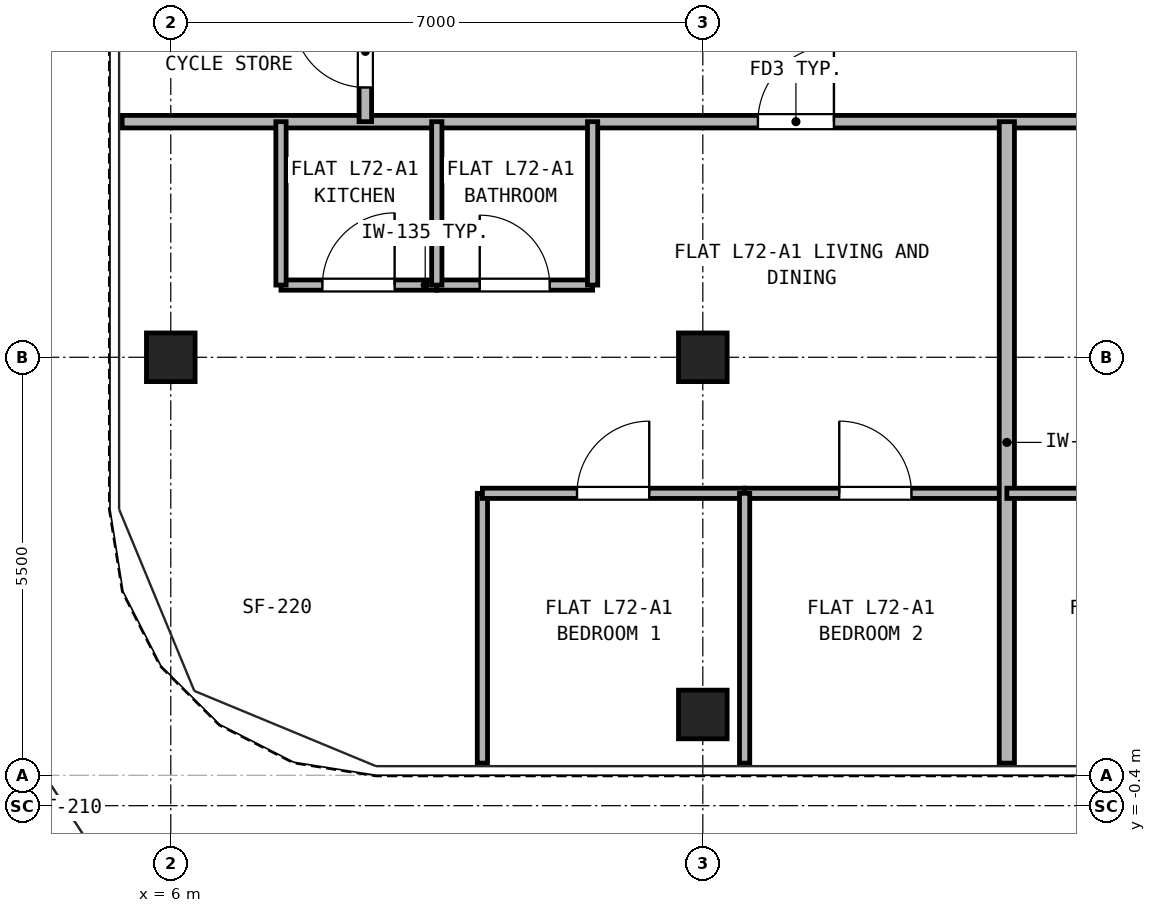
"""IFC4 building model, lengths in metres.
Left out: names, types, materials, properties, quantities, classifications, styles, units other than length and angle.
Written with IfcOpenShell. Run it as: python <this file> out.ifc"""

import sys

from ifc_helpers import new_model, si_unit, direction, frame, frame_2d, origin, origin_2d, place, context, subcontext, project, spatial, rectangle, hollow_rectangle, extrude, source, transform, mapped, element, fill, save


model = new_model("IFC4")
c1 = context("Model", 3, precision=1e-05, world=origin(), true_north=direction((0.0, 1.0)))
c2 = subcontext(c1, "Body", "Model", "MODEL_VIEW")
j1 = project(units=[si_unit("LENGTHUNIT", "METRE"), si_unit("PLANEANGLEUNIT", "RADIAN")], contexts=[c1])
p1 = place(None, origin())
s1 = spatial("IfcSite", under=j1, at=p1, CompositionType="ELEMENT")
p2 = place(p1, origin())
s2 = spatial("IfcBuilding", under=s1, at=p2, CompositionType="ELEMENT")
p3 = place(p2, frame((0.0, 0.0, 252.1)))
s3 = spatial("IfcBuildingStorey", under=s2, at=p3, CompositionType="ELEMENT", Elevation=252.1)
m1 = source(origin(), c2, "Body", "SweptSolid", [
    extrude(hollow_rectangle(XDim=0.64, YDim=0.64, WallThickness=0.035, at=origin_2d()), origin(), (0.0, 0.0, 1.0), 2.98),
])
for number, where, z_axis, x_axis in (
    (1, (13.0, 0.8, 0.0), (0.0, 0.0, 1.0), (1.0, 0.0, 0.0)),
    (2, (6.0, 5.5, 0.0), (0.0, 0.0, 1.0), (1.0, 0.0, 0.0)),
    (3, (13.0, 5.5, 0.0), (0.0, 0.0, 1.0), (1.0, 0.0, 0.0)),
):
    element("IfcColumn", number, at=place(p3, frame(where, z_axis=z_axis, x_axis=x_axis)), inside=s3, PredefinedType="COLUMN", context=c2, shape_type="MappedRepresentation", body=[
        mapped(m1, transform((0.0, 0.0, 0.0), x_axis=(1.0, 0.0, 0.0), y_axis=(0.0, 1.0, 0.0), z_axis=(0.0, 0.0, 1.0), scale=1.0)),
    ])
p4 = place(p3, frame((5.36, 8.6, 0.0), z_axis=(0.0, 0.0, 1.0), x_axis=(1.0, 0.0, 0.0)))
e4 = element("IfcWall", 4, at=p4, inside=s3, PredefinedType="PARTITIONING", context=c2, shape_type="SweptSolid", body=[
    extrude(rectangle(XDim=36.28, YDim=0.165, at=frame_2d((18.14, 0.0))), origin(), (0.0, 0.0, 1.0), 2.655),
])
p5 = place(p4, frame((8.365, 0.0, 0.0)))
e5 = element("IfcOpeningElement", 5, at=p5, cuts=e4, PredefinedType="OPENING", context=c2, shape_type="SweptSolid", body=[
    extrude(rectangle(XDim=1.0, YDim=2.15, at=frame_2d((0.5, 1.075))), frame((0.0, 0.093, 0.0), z_axis=(0.0, -1.0, 0.0), x_axis=(1.0, 0.0, 0.0)), (0.0, 0.0, 1.0), 0.185),
])
p6 = place(p4, frame((14.165, 0.0, 0.0)))
e6 = element("IfcOpeningElement", 6, at=p6, cuts=e4, PredefinedType="OPENING", context=c2, shape_type="SweptSolid", body=[
    extrude(rectangle(XDim=1.0, YDim=2.15, at=frame_2d((0.5, 1.075))), frame((0.0, 0.093, 0.0), z_axis=(0.0, -1.0, 0.0), x_axis=(1.0, 0.0, 0.0)), (0.0, 0.0, 1.0), 0.185),
])
p7 = place(p4, frame((26.415, 0.0, 0.0)))
e7 = element("IfcOpeningElement", 7, at=p7, cuts=e4, PredefinedType="OPENING", context=c2, shape_type="SweptSolid", body=[
    extrude(rectangle(XDim=1.0, YDim=2.15, at=frame_2d((0.5, 1.075))), frame((0.0, 0.093, 0.0), z_axis=(0.0, -1.0, 0.0), x_axis=(1.0, 0.0, 0.0)), (0.0, 0.0, 1.0), 0.185),
])
p8 = place(p3, frame((8.56, 8.6, 0.0), z_axis=(0.0, 0.0, 1.0), x_axis=(0.0, 1.0, 0.0)))
e8 = element("IfcWall", 8, at=p8, inside=s3, PredefinedType="PARTITIONING", context=c2, shape_type="SweptSolid", body=[
    extrude(rectangle(XDim=2.0, YDim=0.165, at=frame_2d((1.0, 0.0))), origin(), (0.0, 0.0, 1.0), 2.98),
])
p9 = place(p8, frame((0.45, 0.0, 0.0)))
e9 = element("IfcOpeningElement", 9, at=p9, cuts=e8, PredefinedType="OPENING", context=c2, shape_type="SweptSolid", body=[
    extrude(rectangle(XDim=0.95, YDim=2.15, at=frame_2d((0.475, 1.075))), frame((0.0, 0.093, 0.0), z_axis=(0.0, -1.0, 0.0), x_axis=(1.0, 0.0, 0.0)), (0.0, 0.0, 1.0), 0.185),
])
p10 = place(p3, frame((7.45, 6.45, 0.0), z_axis=(0.0, 0.0, 1.0), x_axis=(1.0, 0.0, 0.0)))
e10 = element("IfcWall", 10, at=p10, inside=s3, PredefinedType="PARTITIONING", context=c2, shape_type="SweptSolid", body=[
    extrude(rectangle(XDim=2.05, YDim=0.135, at=frame_2d((1.025, 0.0))), origin(), (0.0, 0.0, 1.0), 2.98),
])
p11 = place(p10, frame((0.545, 0.0, 0.0)))
e11 = element("IfcOpeningElement", 11, at=p11, cuts=e10, PredefinedType="OPENING", context=c2, shape_type="SweptSolid", body=[
    extrude(rectangle(XDim=0.95, YDim=2.15, at=frame_2d((0.475, 1.075))), frame((0.0, 0.077, 0.0), z_axis=(0.0, -1.0, 0.0), x_axis=(1.0, 0.0, 0.0)), (0.0, 0.0, 1.0), 0.155),
])
p12 = place(p3, frame((9.5, 6.45, 0.0), z_axis=(0.0, 0.0, 1.0), x_axis=(1.0, 0.0, 0.0)))
e12 = element("IfcWall", 12, at=p12, inside=s3, PredefinedType="PARTITIONING", context=c2, shape_type="SweptSolid", body=[
    extrude(rectangle(XDim=2.05, YDim=0.135, at=frame_2d((1.025, 0.0))), origin(), (0.0, 0.0, 1.0), 2.98),
])
p13 = place(p12, frame((0.565, 0.0, 0.0)))
e13 = element("IfcOpeningElement", 13, at=p13, cuts=e12, PredefinedType="OPENING", context=c2, shape_type="SweptSolid", body=[
    extrude(rectangle(XDim=0.92, YDim=2.1, at=frame_2d((0.46, 1.05))), frame((0.0, 0.077, 0.0), z_axis=(0.0, -1.0, 0.0), x_axis=(1.0, 0.0, 0.0)), (0.0, 0.0, 1.0), 0.155),
])
for number, where, z_axis, x_axis in (
    (14, (7.45, 6.45, 0.0), (0.0, 0.0, 1.0), (0.0, 1.0, 0.0)),
    (15, (9.5, 6.45, 0.0), (0.0, 0.0, 1.0), (0.0, 1.0, 0.0)),
    (16, (11.55, 6.45, 0.0), (0.0, 0.0, 1.0), (0.0, 1.0, 0.0)),
):
    element("IfcWall", number, at=place(p3, frame(where, z_axis=z_axis, x_axis=x_axis)), inside=s3, PredefinedType="PARTITIONING", context=c2, shape_type="SweptSolid", body=[
        extrude(rectangle(XDim=2.15, YDim=0.135, at=frame_2d((1.075, 0.0))), origin(), (0.0, 0.0, 1.0), 2.98),
    ])
p14 = place(p3, frame((10.1, 0.16, 0.0), z_axis=(0.0, 0.0, 1.0), x_axis=(0.0, 1.0, 0.0)))
e17 = element("IfcWall", 17, at=p14, inside=s3, PredefinedType="PARTITIONING", context=c2, shape_type="SweptSolid", body=[
    extrude(rectangle(XDim=3.55, YDim=0.135, at=frame_2d((1.775, 0.0))), origin(), (0.0, 0.0, 1.0), 2.98),
])
p15 = place(p3, frame((10.1, 3.71, 0.0), z_axis=(0.0, 0.0, 1.0), x_axis=(1.0, 0.0, 0.0)))
e18 = element("IfcWall", 18, at=p15, inside=s3, PredefinedType="PARTITIONING", context=c2, shape_type="SweptSolid", body=[
    extrude(rectangle(XDim=3.45, YDim=0.135, at=frame_2d((1.725, 0.0))), origin(), (0.0, 0.0, 1.0), 2.98),
])
p16 = place(p15, frame((1.245, 0.0, 0.0)))
e19 = element("IfcOpeningElement", 19, at=p16, cuts=e18, PredefinedType="OPENING", context=c2, shape_type="SweptSolid", body=[
    extrude(rectangle(XDim=0.95, YDim=2.15, at=frame_2d((0.475, 1.075))), frame((0.0, 0.077, 0.0), z_axis=(0.0, -1.0, 0.0), x_axis=(1.0, 0.0, 0.0)), (0.0, 0.0, 1.0), 0.155),
])
p17 = place(p3, frame((13.55, 3.71, 0.0), z_axis=(0.0, 0.0, 1.0), x_axis=(1.0, 0.0, 0.0)))
e20 = element("IfcWall", 20, at=p17, inside=s3, PredefinedType="PARTITIONING", context=c2, shape_type="SweptSolid", body=[
    extrude(rectangle(XDim=3.45, YDim=0.135, at=frame_2d((1.725, 0.0))), origin(), (0.0, 0.0, 1.0), 2.98),
])
p18 = place(p17, frame((1.245, 0.0, 0.0)))
e21 = element("IfcOpeningElement", 21, at=p18, cuts=e20, PredefinedType="OPENING", context=c2, shape_type="SweptSolid", body=[
    extrude(rectangle(XDim=0.95, YDim=2.15, at=frame_2d((0.475, 1.075))), frame((0.0, 0.077, 0.0), z_axis=(0.0, -1.0, 0.0), x_axis=(1.0, 0.0, 0.0)), (0.0, 0.0, 1.0), 0.155),
])
p19 = place(p3, frame((13.55, 0.16, 0.0), z_axis=(0.0, 0.0, 1.0), x_axis=(0.0, 1.0, 0.0)))
e22 = element("IfcWall", 22, at=p19, inside=s3, PredefinedType="PARTITIONING", context=c2, shape_type="SweptSolid", body=[
    extrude(rectangle(XDim=3.55, YDim=0.135, at=frame_2d((1.775, 0.0))), origin(), (0.0, 0.0, 1.0), 2.98),
])
p20 = place(p3, frame((17.0, 0.16, 0.0), z_axis=(0.0, 0.0, 1.0), x_axis=(0.0, 1.0, 0.0)))
e23 = element("IfcWall", 23, at=p20, inside=s3, PredefinedType="PARTITIONING", context=c2, shape_type="SweptSolid", body=[
    extrude(rectangle(XDim=8.44, YDim=0.2, at=frame_2d((4.22, 0.0))), origin(), (0.0, 0.0, 1.0), 2.98),
])
p21 = place(p3, frame((17.0, 3.71, 0.0), z_axis=(0.0, 0.0, 1.0), x_axis=(1.0, 0.0, 0.0)))
e24 = element("IfcWall", 24, at=p21, inside=s3, PredefinedType="PARTITIONING", context=c2, shape_type="SweptSolid", body=[
    extrude(rectangle(XDim=3.45, YDim=0.135, at=frame_2d((1.725, 0.0))), origin(), (0.0, 0.0, 1.0), 2.98),
])
p22 = place(p21, frame((1.245, 0.0, 0.0)))
e25 = element("IfcOpeningElement", 25, at=p22, cuts=e24, PredefinedType="OPENING", context=c2, shape_type="SweptSolid", body=[
    extrude(rectangle(XDim=0.95, YDim=2.15, at=frame_2d((0.475, 1.075))), frame((0.0, 0.077, 0.0), z_axis=(0.0, -1.0, 0.0), x_axis=(1.0, 0.0, 0.0)), (0.0, 0.0, 1.0), 0.155),
])
p23 = place(p11, origin())
e26 = element("IfcDoor", 26, at=p23, inside=s3, OperationType="SINGLE_SWING_RIGHT", PredefinedType="DOOR", context=c2, shape_type="SweptSolid", body=[
    extrude(rectangle(XDim=0.95, YDim=2.15, at=frame_2d((0.475, 1.075))), frame((0.0, 0.025, 0.0), z_axis=(0.0, -1.0, 0.0), x_axis=(1.0, 0.0, 0.0)), (0.0, 0.0, 1.0), 0.05),
])
fill(e11, e26)
p24 = place(p13, origin())
e27 = element("IfcDoor", 27, at=p24, inside=s3, OperationType="SINGLE_SWING_LEFT", PredefinedType="DOOR", context=c2, shape_type="SweptSolid", body=[
    extrude(rectangle(XDim=0.92, YDim=2.1, at=frame_2d((0.46, 1.05))), frame((0.0, 0.025, 0.0), z_axis=(0.0, -1.0, 0.0), x_axis=(1.0, 0.0, 0.0)), (0.0, 0.0, 1.0), 0.05),
])
fill(e13, e27)
p25 = place(p16, frame((0.95, 0.0, 0.0), z_axis=(0.0, 0.0, 1.0), x_axis=(-1.0, 0.0, 0.0)))
e28 = element("IfcDoor", 28, at=p25, inside=s3, OperationType="SINGLE_SWING_RIGHT", PredefinedType="DOOR", context=c2, shape_type="SweptSolid", body=[
    extrude(rectangle(XDim=0.95, YDim=2.15, at=frame_2d((0.475, 1.075))), frame((0.0, 0.025, 0.0), z_axis=(0.0, -1.0, 0.0), x_axis=(1.0, 0.0, 0.0)), (0.0, 0.0, 1.0), 0.05),
])
fill(e19, e28)
p26 = place(p18, frame((0.95, 0.0, 0.0), z_axis=(0.0, 0.0, 1.0), x_axis=(-1.0, 0.0, 0.0)))
e29 = element("IfcDoor", 29, at=p26, inside=s3, OperationType="SINGLE_SWING_LEFT", PredefinedType="DOOR", context=c2, shape_type="SweptSolid", body=[
    extrude(rectangle(XDim=0.95, YDim=2.15, at=frame_2d((0.475, 1.075))), frame((0.0, 0.025, 0.0), z_axis=(0.0, -1.0, 0.0), x_axis=(1.0, 0.0, 0.0)), (0.0, 0.0, 1.0), 0.05),
])
fill(e21, e29)
p27 = place(p5, frame((1.0, 0.0, 0.0), z_axis=(0.0, 0.0, 1.0), x_axis=(-1.0, 0.0, 0.0)))
e30 = element("IfcDoor", 30, at=p27, inside=s3, OperationType="SINGLE_SWING_RIGHT", PredefinedType="DOOR", context=c2, shape_type="SweptSolid", body=[
    extrude(rectangle(XDim=1.0, YDim=2.15, at=frame_2d((0.5, 1.075))), frame((0.0, 0.025, 0.0), z_axis=(0.0, -1.0, 0.0), x_axis=(1.0, 0.0, 0.0)), (0.0, 0.0, 1.0), 0.05),
])
fill(e5, e30)
p28 = place(p9, frame((0.95, 0.0, 0.0), z_axis=(0.0, 0.0, 1.0), x_axis=(-1.0, 0.0, 0.0)))
e31 = element("IfcDoor", 31, at=p28, inside=s3, OperationType="SINGLE_SWING_RIGHT", PredefinedType="DOOR", context=c2, shape_type="SweptSolid", body=[
    extrude(rectangle(XDim=0.95, YDim=2.15, at=frame_2d((0.475, 1.075))), frame((0.0, 0.025, 0.0), z_axis=(0.0, -1.0, 0.0), x_axis=(1.0, 0.0, 0.0)), (0.0, 0.0, 1.0), 0.05),
])
fill(e9, e31)
save(model, sys.argv[1])
